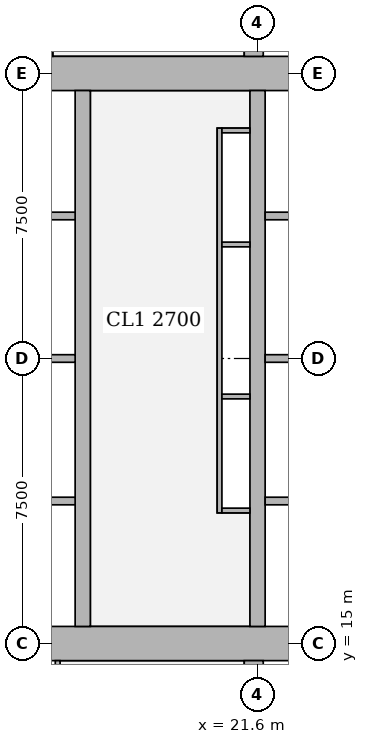
"""IFC4 building model, lengths in metres.
Left out: names, types, materials, properties, quantities, classifications, styles, units other than length and angle.
Written with IfcOpenShell. Run it as: python <this file> out.ifc"""

import sys

from ifc_helpers import new_model, si_unit, direction, frame, frame_2d, origin, place, context, subcontext, project, spatial, rectangle, extrude, element, fill, save


model = new_model("IFC4")
c1 = context("Model", 3, precision=1e-05, world=origin(), true_north=direction((0.0, 1.0)))
c2 = subcontext(c1, "Body", "Model", "MODEL_VIEW")
j1 = project(units=[si_unit("LENGTHUNIT", "METRE"), si_unit("PLANEANGLEUNIT", "RADIAN")], contexts=[c1])
p1 = place(None, origin())
s1 = spatial("IfcSite", under=j1, at=p1, CompositionType="ELEMENT")
p2 = place(p1, origin())
s2 = spatial("IfcBuilding", under=s1, at=p2, CompositionType="ELEMENT")
p3 = place(p2, frame((0.0, 0.0, 53.75)))
s3 = spatial("IfcBuildingStorey", under=s2, at=p3, CompositionType="ELEMENT", Elevation=53.75)
p4 = place(p3, frame((13.95, 15.0, 0.0), z_axis=(0.0, 0.0, 1.0), x_axis=(1.0, 0.0, 0.0)))
e1 = element("IfcWall", 1, at=p4, inside=s3, PredefinedType="SHEAR", context=c2, shape_type="SweptSolid", body=[
    extrude(rectangle(XDim=15.3, YDim=0.9, at=frame_2d((7.65, 0.0))), origin(), (0.0, 0.0, 1.0), 3.75),
])
p5 = place(p4, frame((4.45, 0.0, 0.0)))
e2 = element("IfcOpeningElement", 2, at=p5, cuts=e1, PredefinedType="OPENING", context=c2, shape_type="SweptSolid", body=[
    extrude(rectangle(XDim=1.8, YDim=2.1, at=frame_2d((0.9, 1.05))), frame((0.0, 0.46, 0.0), z_axis=(0.0, -1.0, 0.0), x_axis=(1.0, 0.0, 0.0)), (0.0, 0.0, 1.0), 0.92),
])
p6 = place(p4, frame((10.7, 0.0, 0.0)))
e3 = element("IfcOpeningElement", 3, at=p6, cuts=e1, PredefinedType="OPENING", context=c2, shape_type="SweptSolid", body=[
    extrude(rectangle(XDim=1.1, YDim=2.1, at=frame_2d((0.55, 1.05))), frame((0.0, 0.46, 0.0), z_axis=(0.0, -1.0, 0.0), x_axis=(1.0, 0.0, 0.0)), (0.0, 0.0, 1.0), 0.92),
])
p7 = place(p3, frame((13.95, 30.0, 0.0), z_axis=(0.0, 0.0, 1.0), x_axis=(1.0, 0.0, 0.0)))
e4 = element("IfcWall", 4, at=p7, inside=s3, PredefinedType="SHEAR", context=c2, shape_type="SweptSolid", body=[
    extrude(rectangle(XDim=15.3, YDim=0.9, at=frame_2d((7.65, 0.0))), origin(), (0.0, 0.0, 1.0), 3.75),
])
p8 = place(p7, frame((4.45, 0.0, 0.0)))
e5 = element("IfcOpeningElement", 5, at=p8, cuts=e4, PredefinedType="OPENING", context=c2, shape_type="SweptSolid", body=[
    extrude(rectangle(XDim=1.8, YDim=2.1, at=frame_2d((0.9, 1.05))), frame((0.0, 0.46, 0.0), z_axis=(0.0, -1.0, 0.0), x_axis=(1.0, 0.0, 0.0)), (0.0, 0.0, 1.0), 0.92),
])
p9 = place(p7, frame((10.7, 0.0, 0.0)))
e6 = element("IfcOpeningElement", 6, at=p9, cuts=e4, PredefinedType="OPENING", context=c2, shape_type="SweptSolid", body=[
    extrude(rectangle(XDim=1.1, YDim=2.1, at=frame_2d((0.55, 1.05))), frame((0.0, 0.46, 0.0), z_axis=(0.0, -1.0, 0.0), x_axis=(1.0, 0.0, 0.0)), (0.0, 0.0, 1.0), 0.92),
])
p10 = place(p3, frame((17.0, 15.45, 0.0), z_axis=(0.0, 0.0, 1.0), x_axis=(0.0, 1.0, 0.0)))
e7 = element("IfcWall", 7, at=p10, inside=s3, PredefinedType="SHEAR", context=c2, shape_type="SweptSolid", body=[
    extrude(rectangle(XDim=14.1, YDim=0.4, at=frame_2d((7.05, 0.0))), origin(), (0.0, 0.0, 1.0), 3.75),
])
p11 = place(p10, frame((0.875, 0.0, 0.0)))
e8 = element("IfcOpeningElement", 8, at=p11, cuts=e7, PredefinedType="OPENING", context=c2, shape_type="SweptSolid", body=[
    extrude(rectangle(XDim=1.1, YDim=2.1, at=frame_2d((0.55, 1.05))), frame((0.0, 0.21, 0.0), z_axis=(0.0, -1.0, 0.0), x_axis=(1.0, 0.0, 0.0)), (0.0, 0.0, 1.0), 0.42),
])
p12 = place(p10, frame((4.625, 0.0, 0.0)))
e9 = element("IfcOpeningElement", 9, at=p12, cuts=e7, PredefinedType="OPENING", context=c2, shape_type="SweptSolid", body=[
    extrude(rectangle(XDim=1.1, YDim=2.1, at=frame_2d((0.55, 1.05))), frame((0.0, 0.21, 0.0), z_axis=(0.0, -1.0, 0.0), x_axis=(1.0, 0.0, 0.0)), (0.0, 0.0, 1.0), 0.42),
])
p13 = place(p10, frame((8.375, 0.0, 0.0)))
e10 = element("IfcOpeningElement", 10, at=p13, cuts=e7, PredefinedType="OPENING", context=c2, shape_type="SweptSolid", body=[
    extrude(rectangle(XDim=1.1, YDim=2.1, at=frame_2d((0.55, 1.05))), frame((0.0, 0.21, 0.0), z_axis=(0.0, -1.0, 0.0), x_axis=(1.0, 0.0, 0.0)), (0.0, 0.0, 1.0), 0.42),
])
p14 = place(p10, frame((12.125, 0.0, 0.0)))
e11 = element("IfcOpeningElement", 11, at=p14, cuts=e7, PredefinedType="OPENING", context=c2, shape_type="SweptSolid", body=[
    extrude(rectangle(XDim=1.1, YDim=2.1, at=frame_2d((0.55, 1.05))), frame((0.0, 0.21, 0.0), z_axis=(0.0, -1.0, 0.0), x_axis=(1.0, 0.0, 0.0)), (0.0, 0.0, 1.0), 0.42),
])
p15 = place(p3, frame((21.6, 15.45, 0.0), z_axis=(0.0, 0.0, 1.0), x_axis=(0.0, 1.0, 0.0)))
e12 = element("IfcWall", 12, at=p15, inside=s3, PredefinedType="SHEAR", context=c2, shape_type="SweptSolid", body=[
    extrude(rectangle(XDim=14.1, YDim=0.4, at=frame_2d((7.05, 0.0))), origin(), (0.0, 0.0, 1.0), 3.75),
])
for number, where, z_axis, x_axis in (
    (13, (21.5, 10.35, 0.0), (0.0, 0.0, 1.0), (0.0, 1.0, 0.0)),
    (14, (21.5, 30.45, 0.0), (0.0, 0.0, 1.0), (0.0, 1.0, 0.0)),
):
    element("IfcWall", number, at=place(p3, frame(where, z_axis=z_axis, x_axis=x_axis)), inside=s3, PredefinedType="SHEAR", context=c2, shape_type="SweptSolid", body=[
        extrude(rectangle(XDim=4.2, YDim=0.5, at=frame_2d((2.1, 0.0))), origin(), (0.0, 0.0, 1.0), 3.75),
    ])
p16 = place(p3, frame((16.34, 10.163, 0.0), z_axis=(0.0, 0.0, 1.0), x_axis=(0.0, 1.0, 0.0)))
e15 = element("IfcWall", 15, at=p16, inside=s3, PredefinedType="PARTITIONING", context=c2, shape_type="SweptSolid", body=[
    extrude(rectangle(XDim=4.387, YDim=0.125, at=frame_2d((2.193, 0.0))), origin(), (0.0, 0.0, 1.0), 3.5),
])
p17 = place(p16, frame((1.637, 0.0, 0.0)))
e16 = element("IfcOpeningElement", 16, at=p17, cuts=e15, PredefinedType="OPENING", context=c2, shape_type="SweptSolid", body=[
    extrude(rectangle(XDim=1.0, YDim=2.1, at=frame_2d((0.5, 1.05))), frame((0.0, 0.073, 0.0), z_axis=(0.0, -1.0, 0.0), x_axis=(1.0, 0.0, 0.0)), (0.0, 0.0, 1.0), 0.145),
])
p18 = place(p3, frame((16.15, 30.45, 0.0), z_axis=(0.0, 0.0, 1.0), x_axis=(0.0, 1.0, 0.0)))
e17 = element("IfcWall", 17, at=p18, inside=s3, PredefinedType="PARTITIONING", context=c2, shape_type="SweptSolid", body=[
    extrude(rectangle(XDim=4.387, YDim=0.125, at=frame_2d((2.193, 0.0))), origin(), (0.0, 0.0, 1.0), 3.5),
])
p19 = place(p18, frame((1.75, 0.0, 0.0)))
e18 = element("IfcOpeningElement", 18, at=p19, cuts=e17, PredefinedType="OPENING", context=c2, shape_type="SweptSolid", body=[
    extrude(rectangle(XDim=1.0, YDim=2.1, at=frame_2d((0.5, 1.05))), frame((0.0, 0.073, 0.0), z_axis=(0.0, -1.0, 0.0), x_axis=(1.0, 0.0, 0.0)), (0.0, 0.0, 1.0), 0.145),
])
p20 = place(p3, frame((20.6, 18.438, 0.0), z_axis=(0.0, 0.0, 1.0), x_axis=(0.0, 1.0, 0.0)))
e19 = element("IfcWall", 19, at=p20, inside=s3, PredefinedType="PARTITIONING", context=c2, shape_type="SweptSolid", body=[
    extrude(rectangle(XDim=10.124, YDim=0.125, at=frame_2d((5.062, 0.0))), origin(), (0.0, 0.0, 1.0), 3.5),
])
p21 = place(p20, frame((1.062, 0.0, 0.0)))
e20 = element("IfcOpeningElement", 20, at=p21, cuts=e19, PredefinedType="OPENING", context=c2, shape_type="SweptSolid", body=[
    extrude(rectangle(XDim=1.0, YDim=2.1, at=frame_2d((0.5, 1.05))), frame((0.0, 0.073, 0.0), z_axis=(0.0, -1.0, 0.0), x_axis=(1.0, 0.0, 0.0)), (0.0, 0.0, 1.0), 0.145),
])
p22 = place(p20, frame((4.562, 0.0, 0.0)))
e21 = element("IfcOpeningElement", 21, at=p22, cuts=e19, PredefinedType="OPENING", context=c2, shape_type="SweptSolid", body=[
    extrude(rectangle(XDim=1.0, YDim=2.1, at=frame_2d((0.5, 1.05))), frame((0.0, 0.073, 0.0), z_axis=(0.0, -1.0, 0.0), x_axis=(1.0, 0.0, 0.0)), (0.0, 0.0, 1.0), 0.145),
])
p23 = place(p20, frame((8.062, 0.0, 0.0)))
e22 = element("IfcOpeningElement", 22, at=p23, cuts=e19, PredefinedType="OPENING", context=c2, shape_type="SweptSolid", body=[
    extrude(rectangle(XDim=1.0, YDim=2.1, at=frame_2d((0.5, 1.05))), frame((0.0, 0.073, 0.0), z_axis=(0.0, -1.0, 0.0), x_axis=(1.0, 0.0, 0.0)), (0.0, 0.0, 1.0), 0.145),
])
for number, where, z_axis, x_axis in (
    (23, (20.663, 18.5, 0.0), (0.0, 0.0, 1.0), (1.0, 0.0, 0.0)),
    (24, (20.663, 28.5, 0.0), (0.0, 0.0, 1.0), (1.0, 0.0, 0.0)),
    (25, (20.663, 21.5, 0.0), (0.0, 0.0, 1.0), (1.0, 0.0, 0.0)),
    (26, (20.663, 25.5, 0.0), (0.0, 0.0, 1.0), (1.0, 0.0, 0.0)),
):
    element("IfcWall", number, at=place(p3, frame(where, z_axis=z_axis, x_axis=x_axis)), inside=s3, PredefinedType="PARTITIONING", context=c2, shape_type="SweptSolid", body=[
        extrude(rectangle(XDim=0.737, YDim=0.125, at=frame_2d((0.368, 0.0))), origin(), (0.0, 0.0, 1.0), 3.5),
    ])
p24 = place(p3, frame((14.85, 18.75, 0.0), z_axis=(0.0, 0.0, 1.0), x_axis=(1.0, 0.0, 0.0)))
e27 = element("IfcWall", 27, at=p24, inside=s3, PredefinedType="SOLIDWALL", context=c2, shape_type="SweptSolid", body=[
    extrude(rectangle(XDim=1.95, YDim=0.2, at=frame_2d((0.975, 0.0))), origin(), (0.0, 0.0, 1.0), 3.5),
])
p25 = place(p3, frame((21.8, 18.75, 0.0), z_axis=(0.0, 0.0, 1.0), x_axis=(1.0, 0.0, 0.0)))
e28 = element("IfcWall", 28, at=p25, inside=s3, PredefinedType="SOLIDWALL", context=c2, shape_type="SweptSolid", body=[
    extrude(rectangle(XDim=2.2, YDim=0.2, at=frame_2d((1.1, 0.0))), origin(), (0.0, 0.0, 1.0), 3.5),
])
p26 = place(p3, frame((14.85, 22.5, 0.0), z_axis=(0.0, 0.0, 1.0), x_axis=(1.0, 0.0, 0.0)))
e29 = element("IfcWall", 29, at=p26, inside=s3, PredefinedType="SOLIDWALL", context=c2, shape_type="SweptSolid", body=[
    extrude(rectangle(XDim=1.95, YDim=0.2, at=frame_2d((0.975, 0.0))), origin(), (0.0, 0.0, 1.0), 3.5),
])
p27 = place(p3, frame((21.8, 22.5, 0.0), z_axis=(0.0, 0.0, 1.0), x_axis=(1.0, 0.0, 0.0)))
e30 = element("IfcWall", 30, at=p27, inside=s3, PredefinedType="SOLIDWALL", context=c2, shape_type="SweptSolid", body=[
    extrude(rectangle(XDim=2.2, YDim=0.2, at=frame_2d((1.1, 0.0))), origin(), (0.0, 0.0, 1.0), 3.5),
])
p28 = place(p3, frame((14.85, 26.25, 0.0), z_axis=(0.0, 0.0, 1.0), x_axis=(1.0, 0.0, 0.0)))
e31 = element("IfcWall", 31, at=p28, inside=s3, PredefinedType="SOLIDWALL", context=c2, shape_type="SweptSolid", body=[
    extrude(rectangle(XDim=1.95, YDim=0.2, at=frame_2d((0.975, 0.0))), origin(), (0.0, 0.0, 1.0), 3.5),
])
p29 = place(p3, frame((21.8, 26.25, 0.0), z_axis=(0.0, 0.0, 1.0), x_axis=(1.0, 0.0, 0.0)))
e32 = element("IfcWall", 32, at=p29, inside=s3, PredefinedType="SOLIDWALL", context=c2, shape_type="SweptSolid", body=[
    extrude(rectangle(XDim=2.2, YDim=0.2, at=frame_2d((1.1, 0.0))), origin(), (0.0, 0.0, 1.0), 3.5),
])
p30 = place(p21, origin())
e33 = element("IfcDoor", 33, at=p30, inside=s3, OperationType="SINGLE_SWING_LEFT", PredefinedType="DOOR", context=c2, shape_type="SweptSolid", body=[
    extrude(rectangle(XDim=1.0, YDim=2.1, at=frame_2d((0.5, 1.05))), frame((0.0, 0.025, 0.0), z_axis=(0.0, -1.0, 0.0), x_axis=(1.0, 0.0, 0.0)), (0.0, 0.0, 1.0), 0.05),
])
fill(e20, e33)
p31 = place(p22, origin())
e34 = element("IfcDoor", 34, at=p31, inside=s3, OperationType="SINGLE_SWING_RIGHT", PredefinedType="DOOR", context=c2, shape_type="SweptSolid", body=[
    extrude(rectangle(XDim=1.0, YDim=2.1, at=frame_2d((0.5, 1.05))), frame((0.0, 0.025, 0.0), z_axis=(0.0, -1.0, 0.0), x_axis=(1.0, 0.0, 0.0)), (0.0, 0.0, 1.0), 0.05),
])
fill(e21, e34)
p32 = place(p23, origin())
e35 = element("IfcDoor", 35, at=p32, inside=s3, OperationType="SINGLE_SWING_RIGHT", PredefinedType="DOOR", context=c2, shape_type="SweptSolid", body=[
    extrude(rectangle(XDim=1.0, YDim=2.1, at=frame_2d((0.5, 1.05))), frame((0.0, 0.025, 0.0), z_axis=(0.0, -1.0, 0.0), x_axis=(1.0, 0.0, 0.0)), (0.0, 0.0, 1.0), 0.05),
])
fill(e22, e35)
p33 = place(p5, origin())
e36 = element("IfcDoor", 36, at=p33, inside=s3, OperationType="DOUBLE_DOOR_SINGLE_SWING", PredefinedType="DOOR", context=c2, shape_type="SweptSolid", body=[
    extrude(rectangle(XDim=1.8, YDim=2.1, at=frame_2d((0.9, 1.05))), frame((0.0, 0.025, 0.0), z_axis=(0.0, -1.0, 0.0), x_axis=(1.0, 0.0, 0.0)), (0.0, 0.0, 1.0), 0.05),
])
fill(e2, e36)
p34 = place(p8, origin())
e37 = element("IfcDoor", 37, at=p34, inside=s3, OperationType="DOUBLE_DOOR_SINGLE_SWING", PredefinedType="DOOR", context=c2, shape_type="SweptSolid", body=[
    extrude(rectangle(XDim=1.8, YDim=2.1, at=frame_2d((0.9, 1.05))), frame((0.0, 0.025, 0.0), z_axis=(0.0, -1.0, 0.0), x_axis=(1.0, 0.0, 0.0)), (0.0, 0.0, 1.0), 0.05),
])
fill(e5, e37)
p35 = place(p11, origin())
e38 = element("IfcDoor", 38, at=p35, inside=s3, OperationType="DOUBLE_DOOR_SLIDING", PredefinedType="DOOR", context=c2, shape_type="SweptSolid", body=[
    extrude(rectangle(XDim=1.1, YDim=2.1, at=frame_2d((0.55, 1.05))), frame((0.0, 0.025, 0.0), z_axis=(0.0, -1.0, 0.0), x_axis=(1.0, 0.0, 0.0)), (0.0, 0.0, 1.0), 0.05),
])
fill(e8, e38)
p36 = place(p12, origin())
e39 = element("IfcDoor", 39, at=p36, inside=s3, OperationType="DOUBLE_DOOR_SLIDING", PredefinedType="DOOR", context=c2, shape_type="SweptSolid", body=[
    extrude(rectangle(XDim=1.1, YDim=2.1, at=frame_2d((0.55, 1.05))), frame((0.0, 0.025, 0.0), z_axis=(0.0, -1.0, 0.0), x_axis=(1.0, 0.0, 0.0)), (0.0, 0.0, 1.0), 0.05),
])
fill(e9, e39)
p37 = place(p13, origin())
e40 = element("IfcDoor", 40, at=p37, inside=s3, OperationType="DOUBLE_DOOR_SLIDING", PredefinedType="DOOR", context=c2, shape_type="SweptSolid", body=[
    extrude(rectangle(XDim=1.1, YDim=2.1, at=frame_2d((0.55, 1.05))), frame((0.0, 0.025, 0.0), z_axis=(0.0, -1.0, 0.0), x_axis=(1.0, 0.0, 0.0)), (0.0, 0.0, 1.0), 0.05),
])
fill(e10, e40)
p38 = place(p14, origin())
e41 = element("IfcDoor", 41, at=p38, inside=s3, OperationType="DOUBLE_DOOR_SLIDING", PredefinedType="DOOR", context=c2, shape_type="SweptSolid", body=[
    extrude(rectangle(XDim=1.1, YDim=2.1, at=frame_2d((0.55, 1.05))), frame((0.0, 0.025, 0.0), z_axis=(0.0, -1.0, 0.0), x_axis=(1.0, 0.0, 0.0)), (0.0, 0.0, 1.0), 0.05),
])
fill(e11, e41)
save(model, sys.argv[1])
